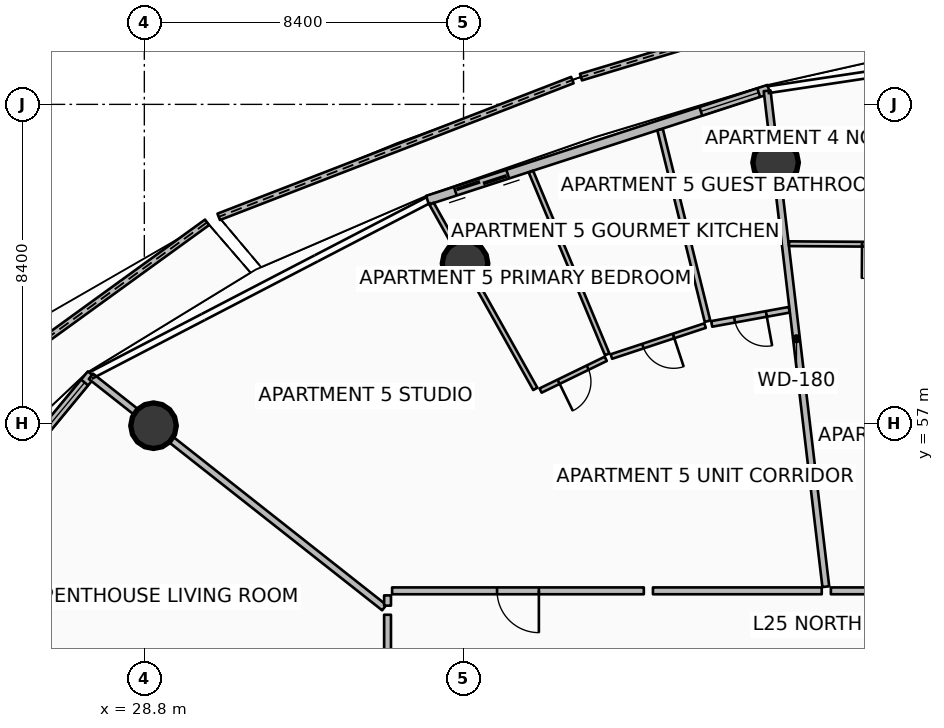
"""IFC4 building model, lengths in metres.
Left out: names, types, materials, properties, quantities, classifications, styles, units other than length and angle.
Written with IfcOpenShell. Run it as: python <this file> out.ifc"""

import sys

from ifc_helpers import new_model, si_unit, direction, frame, frame_2d, origin, origin_2d, place, context, subcontext, project, spatial, polyline, rectangle, circle, outline, extrude, element, fill, save


model = new_model("IFC4")
c1 = context("Model", 3, precision=1e-05, world=origin(), true_north=direction((0.0, 1.0)))
c2 = subcontext(c1, "Body", "Model", "MODEL_VIEW")
j1 = project(units=[si_unit("LENGTHUNIT", "METRE"), si_unit("PLANEANGLEUNIT", "RADIAN")], contexts=[c1])
p1 = place(None, origin())
s1 = spatial("IfcSite", under=j1, at=p1, CompositionType="ELEMENT")
p2 = place(p1, origin())
s2 = spatial("IfcBuilding", under=s1, at=p2, CompositionType="ELEMENT")
p3 = place(p2, frame((0.0, 0.0, 101.4)))
s3 = spatial("IfcBuildingStorey", under=s2, at=p3, CompositionType="ELEMENT", Elevation=101.4)
for number, where, z_axis, x_axis in (
    (1, (45.412, 63.869, 0.0), (0.0, 0.0, 1.0), (1.0, 0.0, 0.0)),
    (2, (37.24, 61.214, 0.0), (0.0, 0.0, 1.0), (1.0, 0.0, 0.0)),
    (3, (29.042, 56.945, 0.0), (0.0, 0.0, 1.0), (1.0, 0.0, 0.0)),
):
    element("IfcColumn", number, at=place(p3, frame(where, z_axis=z_axis, x_axis=x_axis)), inside=s3, PredefinedType="COLUMN", context=c2, shape_type="SweptSolid", body=[
        extrude(circle(Radius=0.6, at=origin_2d()), origin(), (0.0, 0.0, 1.0), 3.5),
    ])
p4 = place(p3, frame((49.962, 69.036, 0.0), z_axis=(0.0, 0.0, 1.0), x_axis=(-0.957356090971, -0.288910565886, 0.0)))
e4 = element("IfcWall", 4, at=p4, inside=s3, PredefinedType="PARAPET", context=c2, shape_type="SweptSolid", body=[
    extrude(outline(polyline([(0.0, 0.0), (10.103, 0.0), (10.103, 1.148), (5.051, 1.284), (0.0, 1.483), (0.0, 0.0)])), frame((0.0, 0.09, 0.0), z_axis=(0.0, -1.0, 0.0), x_axis=(1.0, 0.0, 0.0)), (0.0, 0.0, 1.0), 0.18),
])
p5 = place(p3, frame((40.063, 66.039, 0.0), z_axis=(0.0, 0.0, 1.0), x_axis=(-0.93269770772, -0.360659099446, 0.0)))
e5 = element("IfcWall", 5, at=p5, inside=s3, PredefinedType="PARAPET", context=c2, shape_type="SweptSolid", body=[
    extrude(outline(polyline([(0.0, 0.0), (9.978, 0.0), (9.978, 1.224), (4.989, 1.127), (0.0, 1.148), (0.0, 0.0)])), frame((0.0, 0.09, 0.0), z_axis=(0.0, -1.0, 0.0), x_axis=(1.0, 0.0, 0.0)), (0.0, 0.0, 1.0), 0.18),
])
p6 = place(p3, frame((30.45, 62.296, 0.0), z_axis=(0.0, 0.0, 1.0), x_axis=(-0.809764200103, -0.58675543477, 0.0)))
e6 = element("IfcWall", 6, at=p6, inside=s3, PredefinedType="PARAPET", context=c2, shape_type="SweptSolid", body=[
    extrude(outline(polyline([(0.0, 0.0), (11.241, 0.0), (11.241, 1.632), (5.621, 1.418), (0.0, 1.233), (0.0, 0.0)])), frame((0.0, 0.09, 0.0), z_axis=(0.0, -1.0, 0.0), x_axis=(1.0, 0.0, 0.0)), (0.0, 0.0, 1.0), 0.18),
])
p7 = place(p3, frame((45.233, 65.797, 0.0), z_axis=(0.0, 0.0, 1.0), x_axis=(-0.951052494852, -0.30902937083, 0.0)))
e7 = element("IfcWall", 7, at=p7, inside=s3, PredefinedType="SOLIDWALL", context=c2, shape_type="SweptSolid", body=[
    extrude(rectangle(XDim=9.444, YDim=0.24, at=frame_2d((4.722, 0.0))), origin(), (0.0, 0.0, 1.0), 2.45),
])
p8 = place(p7, frame((7.224, 0.0, 0.0)))
e8 = element("IfcOpeningElement", 8, at=p8, cuts=e7, PredefinedType="OPENING", context=c2, shape_type="SweptSolid", body=[
    extrude(rectangle(XDim=1.45, YDim=2.15, at=frame_2d((0.725, 1.075))), frame((0.0, 0.13, 0.0), z_axis=(0.0, -1.0, 0.0), x_axis=(1.0, 0.0, 0.0)), (0.0, 0.0, 1.0), 0.26),
])
p9 = place(p7, frame((0.28, 0.0, 0.65)))
e9 = element("IfcOpeningElement", 9, at=p9, cuts=e7, PredefinedType="OPENING", context=c2, shape_type="SweptSolid", body=[
    extrude(rectangle(XDim=1.6, YDim=1.5, at=frame_2d((0.8, 0.75))), frame((0.0, 0.13, 0.0), z_axis=(0.0, -1.0, 0.0), x_axis=(1.0, 0.0, 0.0)), (0.0, 0.0, 1.0), 0.26),
])
p10 = place(p3, frame((27.407, 58.298, 0.0), z_axis=(0.0, 0.0, 1.0), x_axis=(-0.636704975, -0.771107498868, 0.0)))
e10 = element("IfcWall", 10, at=p10, inside=s3, PredefinedType="SOLIDWALL", context=c2, shape_type="SweptSolid", body=[
    extrude(rectangle(XDim=11.084, YDim=0.24, at=frame_2d((5.542, 0.0))), origin(), (0.0, 0.0, 1.0), 2.45),
])
p11 = place(p10, frame((8.864, 0.0, 0.0)))
e11 = element("IfcOpeningElement", 11, at=p11, cuts=e10, PredefinedType="OPENING", context=c2, shape_type="SweptSolid", body=[
    extrude(rectangle(XDim=1.45, YDim=2.15, at=frame_2d((0.725, 1.075))), frame((0.0, 0.13, 0.0), z_axis=(0.0, -1.0, 0.0), x_axis=(1.0, 0.0, 0.0)), (0.0, 0.0, 1.0), 0.26),
])
p12 = place(p10, frame((0.28, 0.0, 0.65)))
e12 = element("IfcOpeningElement", 12, at=p12, cuts=e10, PredefinedType="OPENING", context=c2, shape_type="SweptSolid", body=[
    extrude(rectangle(XDim=1.6, YDim=1.5, at=frame_2d((0.8, 0.75))), frame((0.0, 0.13, 0.0), z_axis=(0.0, -1.0, 0.0), x_axis=(1.0, 0.0, 0.0)), (0.0, 0.0, 1.0), 0.26),
])
p13 = place(p3, frame((46.732, 52.709, 0.0), z_axis=(0.0, 0.0, 1.0), x_axis=(-0.117532311618, 0.993069058891, 0.0)))
e13 = element("IfcWall", 13, at=p13, inside=s3, PredefinedType="PARTITIONING", context=c2, shape_type="SweptSolid", body=[
    extrude(rectangle(XDim=13.138, YDim=0.18, at=frame_2d((6.569, 0.0))), origin(), (0.0, 0.0, 1.0), 2.94),
])
p14 = place(p3, frame((35.114, 52.159, 0.0), z_axis=(0.0, 0.0, 1.0), x_axis=(-0.785295873565, 0.619120659453, 0.0)))
e14 = element("IfcWall", 14, at=p14, inside=s3, PredefinedType="PARTITIONING", context=c2, shape_type="SweptSolid", body=[
    extrude(rectangle(XDim=9.829, YDim=0.18, at=frame_2d((4.915, 0.0))), origin(), (0.0, 0.0, 1.0), 2.94),
])
p15 = place(p3, frame((35.2, 51.971, 0.0), z_axis=(0.0, 0.0, 1.0), x_axis=(0.0, -1.0, 0.0)))
e15 = element("IfcWall", 15, at=p15, inside=s3, PredefinedType="PARTITIONING", context=c2, shape_type="SweptSolid", body=[
    extrude(rectangle(XDim=6.241, YDim=0.18, at=frame_2d((3.12, 0.0))), origin(), (0.0, 0.0, 1.0), 2.94),
])
p16 = place(p15, frame((2.57, 0.0, 0.0)))
e16 = element("IfcOpeningElement", 16, at=p16, cuts=e15, PredefinedType="OPENING", context=c2, shape_type="SweptSolid", body=[
    extrude(rectangle(XDim=1.1, YDim=2.1, at=frame_2d((0.55, 1.05))), frame((0.0, 0.1, 0.0), z_axis=(0.0, -1.0, 0.0), x_axis=(1.0, 0.0, 0.0)), (0.0, 0.0, 1.0), 0.2),
])
p17 = place(p3, frame((50.869, 52.6, 0.0), z_axis=(0.0, 0.0, 1.0), x_axis=(-1.0, 0.0, 0.0)))
e17 = element("IfcWall", 17, at=p17, inside=s3, PredefinedType="PARTITIONING", context=c2, shape_type="SweptSolid", body=[
    extrude(rectangle(XDim=4.004, YDim=0.18, at=frame_2d((2.002, 0.0))), origin(), (0.0, 0.0, 1.0), 2.94),
])
p18 = place(p3, frame((50.509, 61.702, 0.0), z_axis=(0.0, 0.0, 1.0), x_axis=(-0.999977627334, 0.006689157742, 0.0)))
e18 = element("IfcWall", 18, at=p18, inside=s3, PredefinedType="PARTITIONING", context=c2, shape_type="SweptSolid", body=[
    extrude(rectangle(XDim=4.745, YDim=0.125, at=frame_2d((2.372, 0.0))), origin(), (0.0, 0.0, 1.0), 2.94),
])
p19 = place(p18, frame((1.922, 0.0, 0.0)))
e19 = element("IfcOpeningElement", 19, at=p19, cuts=e18, PredefinedType="OPENING", context=c2, shape_type="SweptSolid", body=[
    extrude(rectangle(XDim=0.9, YDim=2.08, at=frame_2d((0.45, 1.04))), frame((0.0, 0.073, 0.0), z_axis=(0.0, -1.0, 0.0), x_axis=(1.0, 0.0, 0.0)), (0.0, 0.0, 1.0), 0.145),
])
p20 = place(p3, frame((41.944, 52.6, 0.0), z_axis=(0.0, 0.0, 1.0), x_axis=(-1.0, 0.0, 0.0)))
e20 = element("IfcWall", 20, at=p20, inside=s3, PredefinedType="PARTITIONING", context=c2, shape_type="SweptSolid", body=[
    extrude(rectangle(XDim=6.624, YDim=0.18, at=frame_2d((3.312, 0.0))), origin(), (0.0, 0.0, 1.0), 2.94),
])
p21 = place(p20, frame((2.762, 0.0, 0.0)))
e21 = element("IfcOpeningElement", 21, at=p21, cuts=e20, PredefinedType="OPENING", context=c2, shape_type="SweptSolid", body=[
    extrude(rectangle(XDim=1.1, YDim=2.1, at=frame_2d((0.55, 1.05))), frame((0.0, 0.1, 0.0), z_axis=(0.0, -1.0, 0.0), x_axis=(1.0, 0.0, 0.0)), (0.0, 0.0, 1.0), 0.2),
])
p22 = place(p3, frame((35.2, 52.48, 0.0), z_axis=(0.0, 0.0, 1.0), x_axis=(0.0, -1.0, 0.0)))
e22 = element("IfcWall", 22, at=p22, inside=s3, PredefinedType="PARTITIONING", context=c2, shape_type="SweptSolid", body=[
    extrude(rectangle(XDim=0.269, YDim=0.18, at=frame_2d((0.135, 0.0))), origin(), (0.0, 0.0, 1.0), 2.94),
])
p23 = place(p3, frame((46.625, 52.6, 0.0), z_axis=(0.0, 0.0, 1.0), x_axis=(-1.0, 0.0, 0.0)))
e23 = element("IfcWall", 23, at=p23, inside=s3, PredefinedType="PARTITIONING", context=c2, shape_type="SweptSolid", body=[
    extrude(rectangle(XDim=4.442, YDim=0.18, at=frame_2d((2.221, 0.0))), origin(), (0.0, 0.0, 1.0), 2.94),
])
p24 = place(p3, frame((39.088, 57.913, 0.0), z_axis=(0.0, 0.0, 1.0), x_axis=(-0.488595379978, 0.872510489716, 0.0)))
e24 = element("IfcWall", 24, at=p24, inside=s3, PredefinedType="PARTITIONING", context=c2, shape_type="SweptSolid", body=[
    extrude(rectangle(XDim=5.583, YDim=0.125, at=frame_2d((2.792, 0.0))), origin(), (0.0, 0.0, 1.0), 2.94),
])
p25 = place(p3, frame((45.77, 59.995, 0.0), z_axis=(0.0, 0.0, 1.0), x_axis=(-0.983792584323, -0.179310208943, 0.0)))
e25 = element("IfcWall", 25, at=p25, inside=s3, PredefinedType="PARTITIONING", context=c2, shape_type="SweptSolid", body=[
    extrude(rectangle(XDim=2.074, YDim=0.15, at=frame_2d((1.037, 0.0))), origin(), (0.0, 0.0, 1.0), 2.94),
])
p26 = place(p25, frame((0.612, 0.0, 0.0)))
e26 = element("IfcOpeningElement", 26, at=p26, cuts=e25, PredefinedType="OPENING", context=c2, shape_type="SweptSolid", body=[
    extrude(rectangle(XDim=0.85, YDim=2.06, at=frame_2d((0.425, 1.03))), frame((0.0, 0.085, 0.0), z_axis=(0.0, -1.0, 0.0), x_axis=(1.0, 0.0, 0.0)), (0.0, 0.0, 1.0), 0.17),
])
p27 = place(p3, frame((43.619, 59.695, 0.0), z_axis=(0.0, 0.0, 1.0), x_axis=(-0.240311723112, 0.970695768887, 0.0)))
e27 = element("IfcWall", 27, at=p27, inside=s3, PredefinedType="PARTITIONING", context=c2, shape_type="SweptSolid", body=[
    extrude(rectangle(XDim=5.193, YDim=0.15, at=frame_2d((2.597, 0.0))), origin(), (0.0, 0.0, 1.0), 2.94),
])
p28 = place(p3, frame((40.979, 58.823, 0.0), z_axis=(0.0, 0.0, 1.0), x_axis=(-0.385130983934, 0.92286192099, 0.0)))
e28 = element("IfcWall", 28, at=p28, inside=s3, PredefinedType="PARTITIONING", context=c2, shape_type="SweptSolid", body=[
    extrude(rectangle(XDim=5.211, YDim=0.125, at=frame_2d((2.605, 0.0))), origin(), (0.0, 0.0, 1.0), 2.94),
])
p29 = place(p3, frame((43.555, 59.579, 0.0), z_axis=(0.0, 0.0, 1.0), x_axis=(-0.949554185533, -0.313603011364, 0.0)))
e29 = element("IfcWall", 29, at=p29, inside=s3, PredefinedType="PARTITIONING", context=c2, shape_type="SweptSolid", body=[
    extrude(rectangle(XDim=2.596, YDim=0.125, at=frame_2d((1.298, 0.0))), origin(), (0.0, 0.0, 1.0), 2.94),
])
p30 = place(p29, frame((0.873, 0.0, 0.0)))
e30 = element("IfcOpeningElement", 30, at=p30, cuts=e29, PredefinedType="OPENING", context=c2, shape_type="SweptSolid", body=[
    extrude(rectangle(XDim=0.85, YDim=2.06, at=frame_2d((0.425, 1.03))), frame((0.0, 0.073, 0.0), z_axis=(0.0, -1.0, 0.0), x_axis=(1.0, 0.0, 0.0)), (0.0, 0.0, 1.0), 0.145),
])
p31 = place(p3, frame((40.942, 58.705, 0.0), z_axis=(0.0, 0.0, 1.0), x_axis=(-0.899211958503, -0.437513261153, 0.0)))
e31 = element("IfcWall", 31, at=p31, inside=s3, PredefinedType="PARTITIONING", context=c2, shape_type="SweptSolid", body=[
    extrude(rectangle(XDim=1.908, YDim=0.125, at=frame_2d((0.954, 0.0))), origin(), (0.0, 0.0, 1.0), 2.94),
])
p32 = place(p31, frame((0.529, 0.0, 0.0)))
e32 = element("IfcOpeningElement", 32, at=p32, cuts=e31, PredefinedType="OPENING", context=c2, shape_type="SweptSolid", body=[
    extrude(rectangle(XDim=0.85, YDim=2.06, at=frame_2d((0.425, 1.03))), frame((0.0, 0.073, 0.0), z_axis=(0.0, -1.0, 0.0), x_axis=(1.0, 0.0, 0.0)), (0.0, 0.0, 1.0), 0.145),
])
p33 = place(p8, origin())
e33 = element("IfcDoor", 33, at=p33, inside=s3, OperationType="DOUBLE_DOOR_SLIDING", PredefinedType="DOOR", context=c2, shape_type="SweptSolid", body=[
    extrude(rectangle(XDim=1.45, YDim=2.15, at=frame_2d((0.725, 1.075))), frame((0.0, 0.025, 0.0), z_axis=(0.0, -1.0, 0.0), x_axis=(1.0, 0.0, 0.0)), (0.0, 0.0, 1.0), 0.05),
])
fill(e8, e33)
p34 = place(p9, origin())
e34 = element("IfcWindow", 34, at=p34, inside=s3, PartitioningType="SINGLE_PANEL", PredefinedType="WINDOW", context=c2, shape_type="SweptSolid", body=[
    extrude(rectangle(XDim=1.6, YDim=1.5, at=frame_2d((0.8, 0.75))), frame((0.0, 0.03, 0.0), z_axis=(0.0, -1.0, 0.0), x_axis=(1.0, 0.0, 0.0)), (0.0, 0.0, 1.0), 0.06),
])
fill(e9, e34)
p35 = place(p12, origin())
e35 = element("IfcWindow", 35, at=p35, inside=s3, PartitioningType="SINGLE_PANEL", PredefinedType="WINDOW", context=c2, shape_type="SweptSolid", body=[
    extrude(rectangle(XDim=1.6, YDim=1.5, at=frame_2d((0.8, 0.75))), frame((0.0, 0.03, 0.0), z_axis=(0.0, -1.0, 0.0), x_axis=(1.0, 0.0, 0.0)), (0.0, 0.0, 1.0), 0.06),
])
fill(e12, e35)
p36 = place(p19, origin())
e36 = element("IfcDoor", 36, at=p36, inside=s3, OperationType="SINGLE_SWING_RIGHT", PredefinedType="DOOR", context=c2, shape_type="SweptSolid", body=[
    extrude(rectangle(XDim=0.9, YDim=2.08, at=frame_2d((0.45, 1.04))), frame((0.0, 0.025, 0.0), z_axis=(0.0, -1.0, 0.0), x_axis=(1.0, 0.0, 0.0)), (0.0, 0.0, 1.0), 0.05),
])
fill(e19, e36)
p37 = place(p21, origin())
e37 = element("IfcDoor", 37, at=p37, inside=s3, OperationType="SINGLE_SWING_LEFT", PredefinedType="DOOR", context=c2, shape_type="SweptSolid", body=[
    extrude(rectangle(XDim=1.1, YDim=2.1, at=frame_2d((0.55, 1.05))), frame((0.0, 0.025, 0.0), z_axis=(0.0, -1.0, 0.0), x_axis=(1.0, 0.0, 0.0)), (0.0, 0.0, 1.0), 0.05),
])
fill(e21, e37)
p38 = place(p26, origin())
e38 = element("IfcDoor", 38, at=p38, inside=s3, OperationType="SINGLE_SWING_LEFT", PredefinedType="DOOR", context=c2, shape_type="SweptSolid", body=[
    extrude(rectangle(XDim=0.85, YDim=2.06, at=frame_2d((0.425, 1.03))), frame((0.0, 0.025, 0.0), z_axis=(0.0, -1.0, 0.0), x_axis=(1.0, 0.0, 0.0)), (0.0, 0.0, 1.0), 0.05),
])
fill(e26, e38)
p39 = place(p30, origin())
e39 = element("IfcDoor", 39, at=p39, inside=s3, OperationType="SINGLE_SWING_LEFT", PredefinedType="DOOR", context=c2, shape_type="SweptSolid", body=[
    extrude(rectangle(XDim=0.85, YDim=2.06, at=frame_2d((0.425, 1.03))), frame((0.0, 0.025, 0.0), z_axis=(0.0, -1.0, 0.0), x_axis=(1.0, 0.0, 0.0)), (0.0, 0.0, 1.0), 0.05),
])
fill(e30, e39)
p40 = place(p32, origin())
e40 = element("IfcDoor", 40, at=p40, inside=s3, OperationType="SINGLE_SWING_RIGHT", PredefinedType="DOOR", context=c2, shape_type="SweptSolid", body=[
    extrude(rectangle(XDim=0.85, YDim=2.06, at=frame_2d((0.425, 1.03))), frame((0.0, 0.025, 0.0), z_axis=(0.0, -1.0, 0.0), x_axis=(1.0, 0.0, 0.0)), (0.0, 0.0, 1.0), 0.05),
])
fill(e32, e40)
save(model, sys.argv[1])
